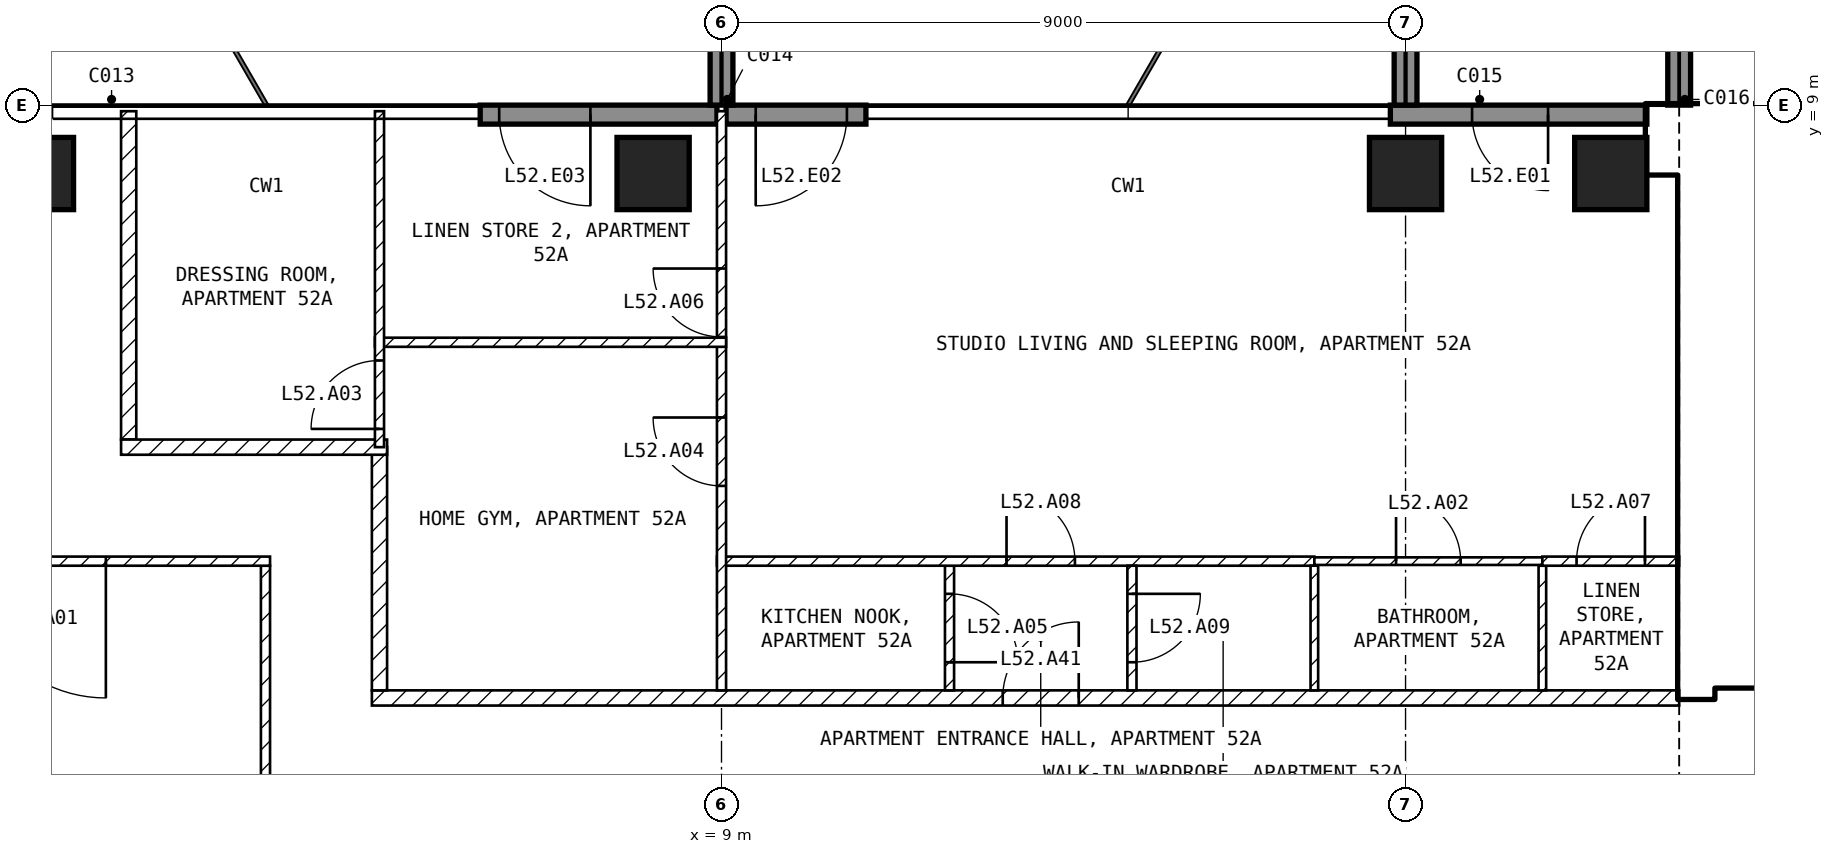
"""IFC4 building model, lengths in metres.
Left out: names, types, materials, properties, quantities, classifications, styles, units other than length and angle.
Written with IfcOpenShell. Run it as: python <this file> out.ifc"""

import sys

from ifc_helpers import new_model, si_unit, direction, frame, frame_2d, origin, origin_2d, place, context, subcontext, project, spatial, rectangle, extrude, element, fill, save


model = new_model("IFC4")
c1 = context("Model", 3, precision=1e-05, world=origin(), true_north=direction((0.0, 1.0)))
c2 = subcontext(c1, "Body", "Model", "MODEL_VIEW")
j1 = project(units=[si_unit("LENGTHUNIT", "METRE"), si_unit("PLANEANGLEUNIT", "RADIAN")], contexts=[c1])
p1 = place(None, origin())
s1 = spatial("IfcSite", under=j1, at=p1, CompositionType="ELEMENT")
p2 = place(p1, origin())
s2 = spatial("IfcBuilding", under=s1, at=p2, CompositionType="ELEMENT")
p3 = place(p2, frame((0.0, 0.0, 208.6)))
s3 = spatial("IfcBuildingStorey", under=s2, at=p3, CompositionType="ELEMENT", Elevation=208.6)
for number, where, z_axis, x_axis in (
    (1, (0.0, 8.1, -0.25), (0.0, 0.0, 1.0), (1.0, 0.0, 0.0)),
    (2, (8.1, 8.1, -0.25), (0.0, 0.0, 1.0), (1.0, 0.0, 0.0)),
    (3, (18.0, 8.1, -0.25), (0.0, 0.0, 1.0), (1.0, 0.0, 0.0)),
    (4, (20.7, 8.1, -0.25), (0.0, 0.0, 1.0), (1.0, 0.0, 0.0)),
):
    element("IfcColumn", number, at=place(p3, frame(where, z_axis=z_axis, x_axis=x_axis)), inside=s3, PredefinedType="COLUMN", context=c2, shape_type="SweptSolid", body=[
        extrude(rectangle(XDim=0.95, YDim=0.95, at=origin_2d()), origin(), (0.0, 0.0, 1.0), 3.5),
    ])
p4 = place(p3, frame((21.175, 8.875, 0.0), z_axis=(0.0, 0.0, 1.0), x_axis=(-1.0, 0.0, 0.0)))
e5 = element("IfcWall", 5, at=p4, inside=s3, PredefinedType="SOLIDWALL", context=c2, shape_type="SweptSolid", body=[
    extrude(rectangle(XDim=3.375, YDim=0.25, at=frame_2d((1.688, 0.0))), origin(), (0.0, 0.0, 1.0), 3.25),
])
p5 = place(p4, frame((1.3, 0.0, 0.0)))
e6 = element("IfcOpeningElement", 6, at=p5, cuts=e5, PredefinedType="OPENING", context=c2, shape_type="SweptSolid", body=[
    extrude(rectangle(XDim=1.0, YDim=2.4, at=frame_2d((0.5, 1.2))), frame((0.0, 0.135, 0.0), z_axis=(0.0, -1.0, 0.0), x_axis=(1.0, 0.0, 0.0)), (0.0, 0.0, 1.0), 0.27),
])
p6 = place(p3, frame((10.9, 8.875, 0.0), z_axis=(0.0, 0.0, 1.0), x_axis=(-1.0, 0.0, 0.0)))
e7 = element("IfcWall", 7, at=p6, inside=s3, PredefinedType="SOLIDWALL", context=c2, shape_type="SweptSolid", body=[
    extrude(rectangle(XDim=1.84, YDim=0.25, at=frame_2d((0.92, 0.0))), origin(), (0.0, 0.0, 1.0), 3.25),
])
p7 = place(p6, frame((0.25, 0.0, 0.0)))
e8 = element("IfcOpeningElement", 8, at=p7, cuts=e7, PredefinedType="OPENING", context=c2, shape_type="SweptSolid", body=[
    extrude(rectangle(XDim=1.2, YDim=2.4, at=frame_2d((0.6, 1.2))), frame((0.0, 0.135, 0.0), z_axis=(0.0, -1.0, 0.0), x_axis=(1.0, 0.0, 0.0)), (0.0, 0.0, 1.0), 0.27),
])
p8 = place(p3, frame((8.94, 8.875, 0.0), z_axis=(0.0, 0.0, 1.0), x_axis=(-1.0, 0.0, 0.0)))
e9 = element("IfcWall", 9, at=p8, inside=s3, PredefinedType="SOLIDWALL", context=c2, shape_type="SweptSolid", body=[
    extrude(rectangle(XDim=3.115, YDim=0.25, at=frame_2d((1.558, 0.0))), origin(), (0.0, 0.0, 1.0), 3.25),
])
p9 = place(p8, frame((1.665, 0.0, 0.0)))
e10 = element("IfcOpeningElement", 10, at=p9, cuts=e9, PredefinedType="OPENING", context=c2, shape_type="SweptSolid", body=[
    extrude(rectangle(XDim=1.2, YDim=2.4, at=frame_2d((0.6, 1.2))), frame((0.0, 0.135, 0.0), z_axis=(0.0, -1.0, 0.0), x_axis=(1.0, 0.0, 0.0)), (0.0, 0.0, 1.0), 0.27),
])
for number, where, z_axis, x_axis in (
    (11, (9.0, 9.0, 0.0), (0.0, 0.0, 1.0), (0.0, 1.0, 0.0)),
    (12, (18.0, 9.0, 0.0), (0.0, 0.0, 1.0), (0.0, 1.0, 0.0)),
    (13, (21.6, 9.0, 0.0), (0.0, 0.0, 1.0), (0.0, 1.0, 0.0)),
):
    element("IfcWall", number, at=place(p3, frame(where, z_axis=z_axis, x_axis=x_axis)), inside=s3, PredefinedType="SOLIDWALL", context=c2, shape_type="SweptSolid", body=[
        extrude(rectangle(XDim=2.7, YDim=0.3, at=frame_2d((1.35, 0.0))), origin(), (0.0, 0.0, 1.0), 3.25),
    ])
p10 = place(p3, frame((21.175, 8.55, 0.0), z_axis=(0.0, 0.0, 1.0), x_axis=(1.0, 0.0, 0.0)))
e14 = element("IfcWall", 14, at=p10, inside=s3, PredefinedType="SHEAR", context=c2, shape_type="SweptSolid", body=[
    extrude(rectangle(XDim=8.425, YDim=0.9, at=frame_2d((4.212, 0.0))), origin(), (0.0, 0.0, 1.0), 3.25),
])
p11 = place(p3, frame((21.825, 1.2, 0.0), z_axis=(0.0, 0.0, 1.0), x_axis=(0.0, 1.0, 0.0)))
e15 = element("IfcWall", 15, at=p11, inside=s3, PredefinedType="SHEAR", context=c2, shape_type="SweptSolid", body=[
    extrude(rectangle(XDim=6.9, YDim=0.45, at=frame_2d((3.45, 0.0))), origin(), (0.0, 0.0, 1.0), 3.25),
])
p12 = place(p3, frame((22.05, 1.45, 0.0), z_axis=(0.0, 0.0, 1.0), x_axis=(1.0, 0.0, 0.0)))
e16 = element("IfcWall", 16, at=p12, inside=s3, PredefinedType="SOLIDWALL", context=c2, shape_type="SweptSolid", body=[
    extrude(rectangle(XDim=11.15, YDim=0.2, at=frame_2d((5.575, 0.0))), origin(), (0.0, 0.0, 1.0), 3.25),
])
p13 = place(p12, frame((0.75, 0.0, 0.0)))
e17 = element("IfcOpeningElement", 17, at=p13, cuts=e16, PredefinedType="OPENING", context=c2, shape_type="SweptSolid", body=[
    extrude(rectangle(XDim=1.0, YDim=2.1, at=frame_2d((0.5, 1.05))), frame((0.0, 0.11, 0.0), z_axis=(0.0, -1.0, 0.0), x_axis=(1.0, 0.0, 0.0)), (0.0, 0.0, 1.0), 0.22),
])
p14 = place(p12, frame((3.25, 0.0, 0.0)))
e18 = element("IfcOpeningElement", 18, at=p14, cuts=e16, PredefinedType="OPENING", context=c2, shape_type="SweptSolid", body=[
    extrude(rectangle(XDim=1.0, YDim=2.1, at=frame_2d((0.5, 1.05))), frame((0.0, 0.11, 0.0), z_axis=(0.0, -1.0, 0.0), x_axis=(1.0, 0.0, 0.0)), (0.0, 0.0, 1.0), 0.22),
])
p15 = place(p12, frame((9.15, 0.0, 0.0)))
e19 = element("IfcOpeningElement", 19, at=p15, cuts=e16, PredefinedType="OPENING", context=c2, shape_type="SweptSolid", body=[
    extrude(rectangle(XDim=0.9, YDim=2.1, at=frame_2d((0.45, 1.05))), frame((0.0, 0.11, 0.0), z_axis=(0.0, -1.0, 0.0), x_axis=(1.0, 0.0, 0.0)), (0.0, 0.0, 1.0), 0.22),
])
p16 = place(p3, frame((22.05, 5.15, 0.0), z_axis=(0.0, 0.0, 1.0), x_axis=(1.0, 0.0, 0.0)))
e20 = element("IfcWall", 20, at=p16, inside=s3, PredefinedType="SOLIDWALL", context=c2, shape_type="SweptSolid", body=[
    extrude(rectangle(XDim=6.3, YDim=0.2, at=frame_2d((3.15, 0.0))), origin(), (0.0, 0.0, 1.0), 3.25),
])
p17 = place(p16, frame((0.2, 0.0, 0.0)))
e21 = element("IfcOpeningElement", 21, at=p17, cuts=e20, PredefinedType="OPENING", context=c2, shape_type="SweptSolid", body=[
    extrude(rectangle(XDim=1.0, YDim=2.1, at=frame_2d((0.5, 1.05))), frame((0.0, 0.11, 0.0), z_axis=(0.0, -1.0, 0.0), x_axis=(1.0, 0.0, 0.0)), (0.0, 0.0, 1.0), 0.22),
])
p18 = place(p3, frame((3.0, -2.94, 0.0), z_axis=(0.0, 0.0, 1.0), x_axis=(0.0, 1.0, 0.0)))
e22 = element("IfcWall", 22, at=p18, inside=s3, PredefinedType="PARTITIONING", context=c2, shape_type="SweptSolid", body=[
    extrude(rectangle(XDim=5.88, YDim=0.12, at=frame_2d((2.94, 0.0))), origin(), (0.0, 0.0, 1.0), 3.25),
])
p19 = place(p3, frame((3.06, 3.0, 0.0), z_axis=(0.0, 0.0, 1.0), x_axis=(-1.0, 0.0, 0.0)))
e23 = element("IfcWall", 23, at=p19, inside=s3, PredefinedType="PARTITIONING", context=c2, shape_type="SweptSolid", body=[
    extrude(rectangle(XDim=6.12, YDim=0.12, at=frame_2d((3.06, 0.0))), origin(), (0.0, 0.0, 1.0), 3.25),
])
p20 = place(p19, frame((2.16, 0.0, 0.0)))
e24 = element("IfcOpeningElement", 24, at=p20, cuts=e23, PredefinedType="OPENING", context=c2, shape_type="SweptSolid", body=[
    extrude(rectangle(XDim=1.8, YDim=2.1, at=frame_2d((0.9, 1.05))), frame((0.0, 0.07, 0.0), z_axis=(0.0, -1.0, 0.0), x_axis=(1.0, 0.0, 0.0)), (0.0, 0.0, 1.0), 0.14),
])
p21 = place(p3, frame((4.4, 1.2, 0.0), z_axis=(0.0, 0.0, 1.0), x_axis=(1.0, 0.0, 0.0)))
e25 = element("IfcWall", 25, at=p21, inside=s3, PredefinedType="PARTITIONING", context=c2, shape_type="SweptSolid", body=[
    extrude(rectangle(XDim=17.2, YDim=0.2, at=frame_2d((8.6, 0.0))), origin(), (0.0, 0.0, 1.0), 3.25),
])
p22 = place(p21, frame((8.3, 0.0, 0.0)))
e26 = element("IfcOpeningElement", 26, at=p22, cuts=e25, PredefinedType="OPENING", context=c2, shape_type="SweptSolid", body=[
    extrude(rectangle(XDim=1.0, YDim=2.1, at=frame_2d((0.5, 1.05))), frame((0.0, 0.11, 0.0), z_axis=(0.0, -1.0, 0.0), x_axis=(1.0, 0.0, 0.0)), (0.0, 0.0, 1.0), 0.22),
])
p23 = place(p3, frame((4.5, 4.5, 0.0), z_axis=(0.0, 0.0, 1.0), x_axis=(0.0, -1.0, 0.0)))
e27 = element("IfcWall", 27, at=p23, inside=s3, PredefinedType="PARTITIONING", context=c2, shape_type="SweptSolid", body=[
    extrude(rectangle(XDim=3.2, YDim=0.2, at=frame_2d((1.6, 0.0))), origin(), (0.0, 0.0, 1.0), 3.25),
])
p24 = place(p3, frame((1.2, 8.92, 0.0), z_axis=(0.0, 0.0, 1.0), x_axis=(0.0, -1.0, 0.0)))
e28 = element("IfcWall", 28, at=p24, inside=s3, PredefinedType="PARTITIONING", context=c2, shape_type="SweptSolid", body=[
    extrude(rectangle(XDim=4.32, YDim=0.2, at=frame_2d((2.16, 0.0))), origin(), (0.0, 0.0, 1.0), 3.25),
])
p25 = place(p3, frame((1.1, 4.5, 0.0), z_axis=(0.0, 0.0, 1.0), x_axis=(1.0, 0.0, 0.0)))
e29 = element("IfcWall", 29, at=p25, inside=s3, PredefinedType="PARTITIONING", context=c2, shape_type="SweptSolid", body=[
    extrude(rectangle(XDim=3.5, YDim=0.2, at=frame_2d((1.75, 0.0))), origin(), (0.0, 0.0, 1.0), 3.25),
])
p26 = place(p3, frame((12.0, 2.94, 0.0), z_axis=(0.0, 0.0, 1.0), x_axis=(0.0, -1.0, 0.0)))
e30 = element("IfcWall", 30, at=p26, inside=s3, PredefinedType="PARTITIONING", context=c2, shape_type="SweptSolid", body=[
    extrude(rectangle(XDim=1.64, YDim=0.12, at=frame_2d((0.82, 0.0))), origin(), (0.0, 0.0, 1.0), 3.25),
])
p27 = place(p26, frame((0.37, 0.0, 0.0)))
e31 = element("IfcOpeningElement", 31, at=p27, cuts=e30, PredefinedType="OPENING", context=c2, shape_type="SweptSolid", body=[
    extrude(rectangle(XDim=0.9, YDim=2.1, at=frame_2d((0.45, 1.05))), frame((0.0, 0.07, 0.0), z_axis=(0.0, -1.0, 0.0), x_axis=(1.0, 0.0, 0.0)), (0.0, 0.0, 1.0), 0.14),
])
p28 = place(p3, frame((8.94, 3.0, 0.0), z_axis=(0.0, 0.0, 1.0), x_axis=(1.0, 0.0, 0.0)))
e32 = element("IfcWall", 32, at=p28, inside=s3, PredefinedType="PARTITIONING", context=c2, shape_type="SweptSolid", body=[
    extrude(rectangle(XDim=7.86, YDim=0.12, at=frame_2d((3.93, 0.0))), origin(), (0.0, 0.0, 1.0), 3.25),
])
p29 = place(p28, frame((3.81, 0.0, 0.0)))
e33 = element("IfcOpeningElement", 33, at=p29, cuts=e32, PredefinedType="OPENING", context=c2, shape_type="SweptSolid", body=[
    extrude(rectangle(XDim=0.9, YDim=2.1, at=frame_2d((0.45, 1.05))), frame((0.0, 0.07, 0.0), z_axis=(0.0, -1.0, 0.0), x_axis=(1.0, 0.0, 0.0)), (0.0, 0.0, 1.0), 0.14),
])
p30 = place(p3, frame((9.0, 1.3, 0.0), z_axis=(0.0, 0.0, 1.0), x_axis=(0.0, 1.0, 0.0)))
e34 = element("IfcWall", 34, at=p30, inside=s3, PredefinedType="PARTITIONING", context=c2, shape_type="SweptSolid", body=[
    extrude(rectangle(XDim=7.62, YDim=0.12, at=frame_2d((3.81, 0.0))), origin(), (0.0, 0.0, 1.0), 3.25),
])
p31 = place(p30, frame((2.69, 0.0, 0.0)))
e35 = element("IfcOpeningElement", 35, at=p31, cuts=e34, PredefinedType="OPENING", context=c2, shape_type="SweptSolid", body=[
    extrude(rectangle(XDim=0.9, YDim=2.1, at=frame_2d((0.45, 1.05))), frame((0.0, 0.07, 0.0), z_axis=(0.0, -1.0, 0.0), x_axis=(1.0, 0.0, 0.0)), (0.0, 0.0, 1.0), 0.14),
])
p32 = place(p30, frame((4.65, 0.0, 0.0)))
e36 = element("IfcOpeningElement", 36, at=p32, cuts=e34, PredefinedType="OPENING", context=c2, shape_type="SweptSolid", body=[
    extrude(rectangle(XDim=0.9, YDim=2.1, at=frame_2d((0.45, 1.05))), frame((0.0, 0.07, 0.0), z_axis=(0.0, -1.0, 0.0), x_axis=(1.0, 0.0, 0.0)), (0.0, 0.0, 1.0), 0.14),
])
p33 = place(p3, frame((14.4, 2.94, 0.0), z_axis=(0.0, 0.0, 1.0), x_axis=(0.0, -1.0, 0.0)))
e37 = element("IfcWall", 37, at=p33, inside=s3, PredefinedType="PARTITIONING", context=c2, shape_type="SweptSolid", body=[
    extrude(rectangle(XDim=1.64, YDim=0.12, at=frame_2d((0.82, 0.0))), origin(), (0.0, 0.0, 1.0), 3.25),
])
p34 = place(p33, frame((0.37, 0.0, 0.0)))
e38 = element("IfcOpeningElement", 38, at=p34, cuts=e37, PredefinedType="OPENING", context=c2, shape_type="SweptSolid", body=[
    extrude(rectangle(XDim=0.9, YDim=2.1, at=frame_2d((0.45, 1.05))), frame((0.0, 0.07, 0.0), z_axis=(0.0, -1.0, 0.0), x_axis=(1.0, 0.0, 0.0)), (0.0, 0.0, 1.0), 0.14),
])
for number, where, z_axis, x_axis in (
    (39, (16.8, 2.94, 0.0), (0.0, 0.0, 1.0), (0.0, -1.0, 0.0)),
    (40, (19.8, 2.94, 0.0), (0.0, 0.0, 1.0), (0.0, -1.0, 0.0)),
):
    element("IfcWall", number, at=place(p3, frame(where, z_axis=z_axis, x_axis=x_axis)), inside=s3, PredefinedType="PARTITIONING", context=c2, shape_type="SweptSolid", body=[
        extrude(rectangle(XDim=1.64, YDim=0.1, at=frame_2d((0.82, 0.0))), origin(), (0.0, 0.0, 1.0), 3.25),
    ])
p35 = place(p3, frame((16.8, 3.0, 0.0), z_axis=(0.0, 0.0, 1.0), x_axis=(1.0, 0.0, 0.0)))
e41 = element("IfcWall", 41, at=p35, inside=s3, PredefinedType="PARTITIONING", context=c2, shape_type="SweptSolid", body=[
    extrude(rectangle(XDim=3.0, YDim=0.1, at=frame_2d((1.5, 0.0))), origin(), (0.0, 0.0, 1.0), 3.25),
])
p36 = place(p35, frame((1.075, 0.0, 0.0)))
e42 = element("IfcOpeningElement", 42, at=p36, cuts=e41, PredefinedType="OPENING", context=c2, shape_type="SweptSolid", body=[
    extrude(rectangle(XDim=0.85, YDim=2.1, at=frame_2d((0.425, 1.05))), frame((0.0, 0.06, 0.0), z_axis=(0.0, -1.0, 0.0), x_axis=(1.0, 0.0, 0.0)), (0.0, 0.0, 1.0), 0.12),
])
p37 = place(p3, frame((19.8, 3.0, 0.0), z_axis=(0.0, 0.0, 1.0), x_axis=(1.0, 0.0, 0.0)))
e43 = element("IfcWall", 43, at=p37, inside=s3, PredefinedType="PARTITIONING", context=c2, shape_type="SweptSolid", body=[
    extrude(rectangle(XDim=1.8, YDim=0.12, at=frame_2d((0.9, 0.0))), origin(), (0.0, 0.0, 1.0), 3.25),
])
p38 = place(p37, frame((0.45, 0.0, 0.0)))
e44 = element("IfcOpeningElement", 44, at=p38, cuts=e43, PredefinedType="OPENING", context=c2, shape_type="SweptSolid", body=[
    extrude(rectangle(XDim=0.9, YDim=2.1, at=frame_2d((0.45, 1.05))), frame((0.0, 0.07, 0.0), z_axis=(0.0, -1.0, 0.0), x_axis=(1.0, 0.0, 0.0)), (0.0, 0.0, 1.0), 0.14),
])
p39 = place(p3, frame((4.44, 5.88, 0.0), z_axis=(0.0, 0.0, 1.0), x_axis=(1.0, 0.0, 0.0)))
e45 = element("IfcWall", 45, at=p39, inside=s3, PredefinedType="PARTITIONING", context=c2, shape_type="SweptSolid", body=[
    extrude(rectangle(XDim=4.62, YDim=0.12, at=frame_2d((2.31, 0.0))), origin(), (0.0, 0.0, 1.0), 3.25),
])
p40 = place(p3, frame((4.5, 4.5, 0.0), z_axis=(0.0, 0.0, 1.0), x_axis=(0.0, 1.0, 0.0)))
e46 = element("IfcWall", 46, at=p40, inside=s3, PredefinedType="PARTITIONING", context=c2, shape_type="SweptSolid", body=[
    extrude(rectangle(XDim=4.42, YDim=0.12, at=frame_2d((2.21, 0.0))), origin(), (0.0, 0.0, 1.0), 3.25),
])
p41 = place(p40, frame((0.24, 0.0, 0.0)))
e47 = element("IfcOpeningElement", 47, at=p41, cuts=e46, PredefinedType="OPENING", context=c2, shape_type="SweptSolid", body=[
    extrude(rectangle(XDim=0.9, YDim=2.1, at=frame_2d((0.45, 1.05))), frame((0.0, 0.07, 0.0), z_axis=(0.0, -1.0, 0.0), x_axis=(1.0, 0.0, 0.0)), (0.0, 0.0, 1.0), 0.14),
])
p42 = place(p5, origin())
e48 = element("IfcDoor", 48, at=p42, inside=s3, OperationType="SINGLE_SWING_LEFT", PredefinedType="DOOR", context=c2, shape_type="SweptSolid", body=[
    extrude(rectangle(XDim=1.0, YDim=2.4, at=frame_2d((0.5, 1.2))), frame((0.0, 0.025, 0.0), z_axis=(0.0, -1.0, 0.0), x_axis=(1.0, 0.0, 0.0)), (0.0, 0.0, 1.0), 0.05),
])
fill(e6, e48)
p43 = place(p7, origin())
e49 = element("IfcDoor", 49, at=p43, inside=s3, OperationType="SINGLE_SWING_RIGHT", PredefinedType="DOOR", context=c2, shape_type="SweptSolid", body=[
    extrude(rectangle(XDim=1.2, YDim=2.4, at=frame_2d((0.6, 1.2))), frame((0.0, 0.025, 0.0), z_axis=(0.0, -1.0, 0.0), x_axis=(1.0, 0.0, 0.0)), (0.0, 0.0, 1.0), 0.05),
])
fill(e8, e49)
p44 = place(p9, origin())
e50 = element("IfcDoor", 50, at=p44, inside=s3, OperationType="SINGLE_SWING_LEFT", PredefinedType="DOOR", context=c2, shape_type="SweptSolid", body=[
    extrude(rectangle(XDim=1.2, YDim=2.4, at=frame_2d((0.6, 1.2))), frame((0.0, 0.025, 0.0), z_axis=(0.0, -1.0, 0.0), x_axis=(1.0, 0.0, 0.0)), (0.0, 0.0, 1.0), 0.05),
])
fill(e10, e50)
p45 = place(p17, origin())
e51 = element("IfcDoor", 51, at=p45, inside=s3, OperationType="SINGLE_SWING_LEFT", PredefinedType="DOOR", context=c2, shape_type="SweptSolid", body=[
    extrude(rectangle(XDim=1.0, YDim=2.1, at=frame_2d((0.5, 1.05))), frame((0.0, 0.025, 0.0), z_axis=(0.0, -1.0, 0.0), x_axis=(1.0, 0.0, 0.0)), (0.0, 0.0, 1.0), 0.05),
])
fill(e21, e51)
p46 = place(p20, origin())
e52 = element("IfcDoor", 52, at=p46, inside=s3, OperationType="SINGLE_SWING_LEFT", PredefinedType="DOOR", context=c2, shape_type="SweptSolid", body=[
    extrude(rectangle(XDim=1.8, YDim=2.1, at=frame_2d((0.9, 1.05))), frame((0.0, 0.025, 0.0), z_axis=(0.0, -1.0, 0.0), x_axis=(1.0, 0.0, 0.0)), (0.0, 0.0, 1.0), 0.05),
])
fill(e24, e52)
p47 = place(p36, origin())
e53 = element("IfcDoor", 53, at=p47, inside=s3, OperationType="SINGLE_SWING_LEFT", PredefinedType="DOOR", context=c2, shape_type="SweptSolid", body=[
    extrude(rectangle(XDim=0.85, YDim=2.1, at=frame_2d((0.425, 1.05))), frame((0.0, 0.025, 0.0), z_axis=(0.0, -1.0, 0.0), x_axis=(1.0, 0.0, 0.0)), (0.0, 0.0, 1.0), 0.05),
])
fill(e42, e53)
p48 = place(p41, origin())
e54 = element("IfcDoor", 54, at=p48, inside=s3, OperationType="SINGLE_SWING_LEFT", PredefinedType="DOOR", context=c2, shape_type="SweptSolid", body=[
    extrude(rectangle(XDim=0.9, YDim=2.1, at=frame_2d((0.45, 1.05))), frame((0.0, 0.025, 0.0), z_axis=(0.0, -1.0, 0.0), x_axis=(1.0, 0.0, 0.0)), (0.0, 0.0, 1.0), 0.05),
])
fill(e47, e54)
p49 = place(p31, origin())
e55 = element("IfcDoor", 55, at=p49, inside=s3, OperationType="SINGLE_SWING_RIGHT", PredefinedType="DOOR", context=c2, shape_type="SweptSolid", body=[
    extrude(rectangle(XDim=0.9, YDim=2.1, at=frame_2d((0.45, 1.05))), frame((0.0, 0.025, 0.0), z_axis=(0.0, -1.0, 0.0), x_axis=(1.0, 0.0, 0.0)), (0.0, 0.0, 1.0), 0.05),
])
fill(e35, e55)
p50 = place(p27, origin())
e56 = element("IfcDoor", 56, at=p50, inside=s3, OperationType="SINGLE_SWING_RIGHT", PredefinedType="DOOR", context=c2, shape_type="SweptSolid", body=[
    extrude(rectangle(XDim=0.9, YDim=2.1, at=frame_2d((0.45, 1.05))), frame((0.0, 0.025, 0.0), z_axis=(0.0, -1.0, 0.0), x_axis=(1.0, 0.0, 0.0)), (0.0, 0.0, 1.0), 0.05),
])
fill(e31, e56)
p51 = place(p32, origin())
e57 = element("IfcDoor", 57, at=p51, inside=s3, OperationType="SINGLE_SWING_RIGHT", PredefinedType="DOOR", context=c2, shape_type="SweptSolid", body=[
    extrude(rectangle(XDim=0.9, YDim=2.1, at=frame_2d((0.45, 1.05))), frame((0.0, 0.025, 0.0), z_axis=(0.0, -1.0, 0.0), x_axis=(1.0, 0.0, 0.0)), (0.0, 0.0, 1.0), 0.05),
])
fill(e36, e57)
p52 = place(p38, origin())
e58 = element("IfcDoor", 58, at=p52, inside=s3, OperationType="SINGLE_SWING_RIGHT", PredefinedType="DOOR", context=c2, shape_type="SweptSolid", body=[
    extrude(rectangle(XDim=0.9, YDim=2.1, at=frame_2d((0.45, 1.05))), frame((0.0, 0.025, 0.0), z_axis=(0.0, -1.0, 0.0), x_axis=(1.0, 0.0, 0.0)), (0.0, 0.0, 1.0), 0.05),
])
fill(e44, e58)
p53 = place(p29, origin())
e59 = element("IfcDoor", 59, at=p53, inside=s3, OperationType="SINGLE_SWING_LEFT", PredefinedType="DOOR", context=c2, shape_type="SweptSolid", body=[
    extrude(rectangle(XDim=0.9, YDim=2.1, at=frame_2d((0.45, 1.05))), frame((0.0, 0.025, 0.0), z_axis=(0.0, -1.0, 0.0), x_axis=(1.0, 0.0, 0.0)), (0.0, 0.0, 1.0), 0.05),
])
fill(e33, e59)
p54 = place(p34, origin())
e60 = element("IfcDoor", 60, at=p54, inside=s3, OperationType="SINGLE_SWING_LEFT", PredefinedType="DOOR", context=c2, shape_type="SweptSolid", body=[
    extrude(rectangle(XDim=0.9, YDim=2.1, at=frame_2d((0.45, 1.05))), frame((0.0, 0.025, 0.0), z_axis=(0.0, -1.0, 0.0), x_axis=(1.0, 0.0, 0.0)), (0.0, 0.0, 1.0), 0.05),
])
fill(e38, e60)
p55 = place(p22, origin())
e61 = element("IfcDoor", 61, at=p55, inside=s3, OperationType="SINGLE_SWING_RIGHT", PredefinedType="DOOR", context=c2, shape_type="SweptSolid", body=[
    extrude(rectangle(XDim=1.0, YDim=2.1, at=frame_2d((0.5, 1.05))), frame((0.0, 0.025, 0.0), z_axis=(0.0, -1.0, 0.0), x_axis=(1.0, 0.0, 0.0)), (0.0, 0.0, 1.0), 0.05),
])
fill(e26, e61)
save(model, sys.argv[1])
